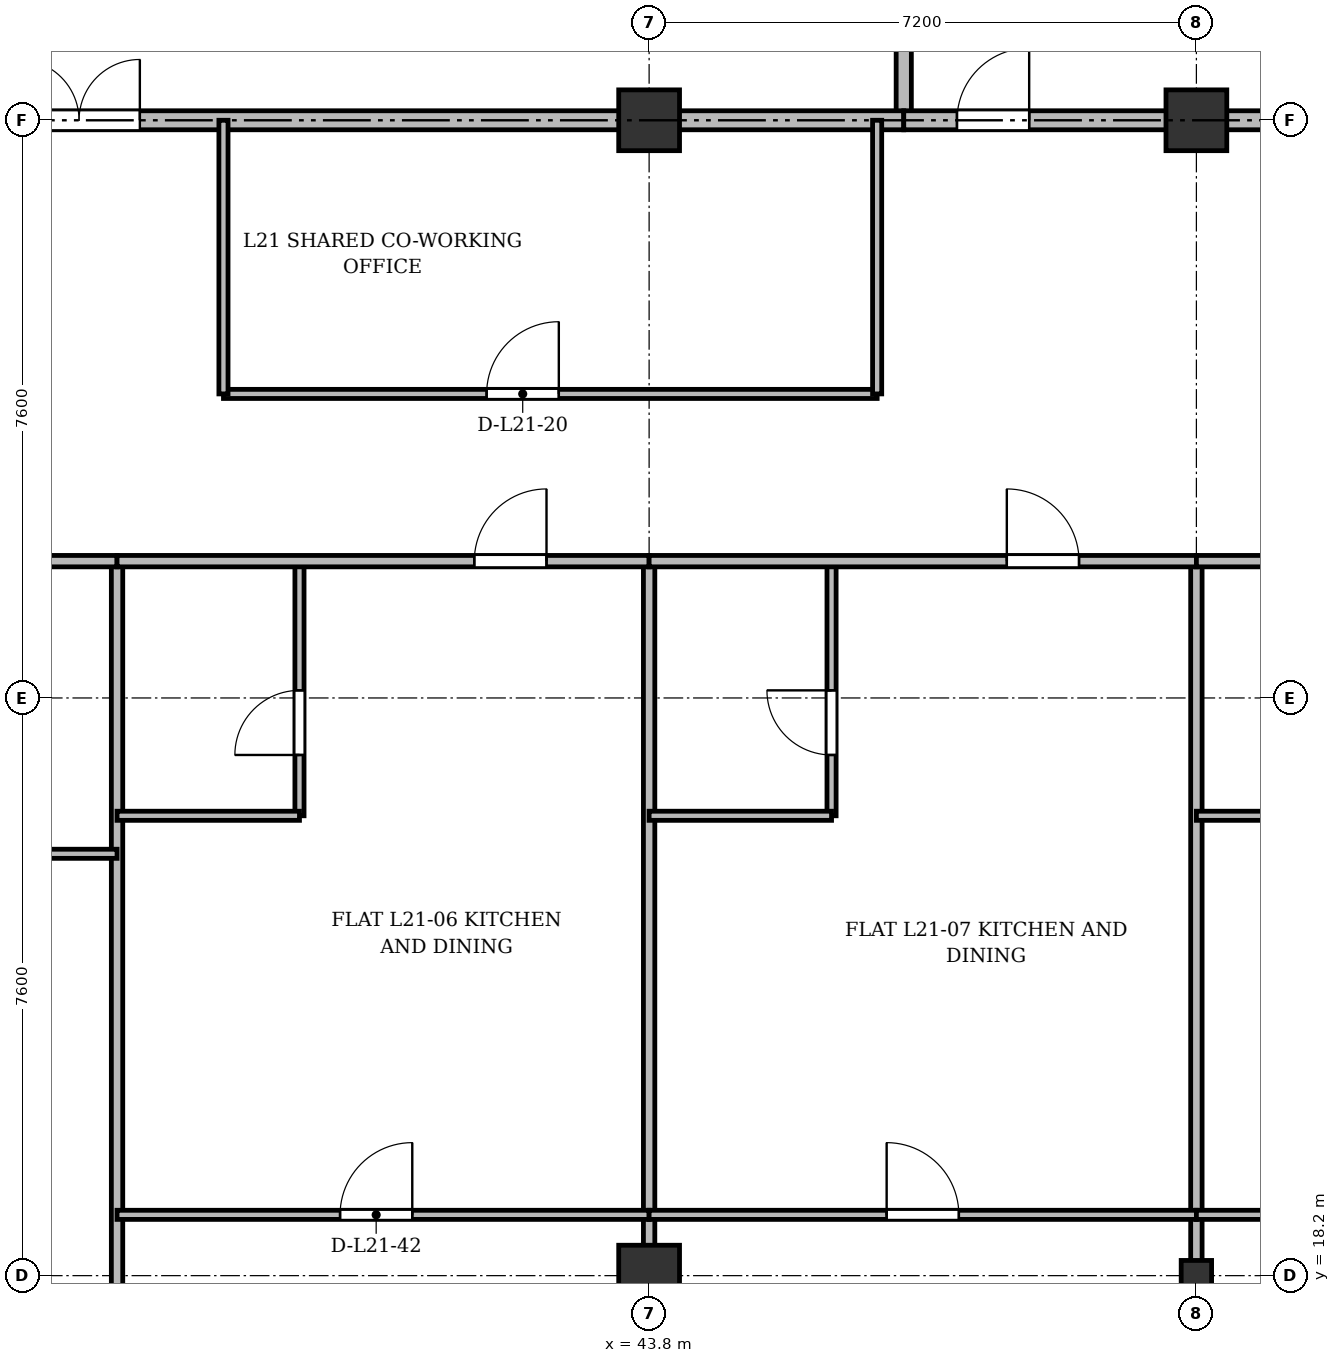
"""IFC4 building model, lengths in metres.
Left out: names, types, materials, properties, quantities, classifications, styles, units other than length and angle.
Written with IfcOpenShell. Run it as: python <this file> out.ifc"""

import sys

from ifc_helpers import new_model, si_unit, direction, frame, frame_2d, origin, origin_2d, place, context, subcontext, project, spatial, rectangle, i_section, extrude, source, transform, mapped, element, fill, save


model = new_model("IFC4")
c1 = context("Model", 3, precision=1e-05, world=origin(), true_north=direction((0.0, 1.0)))
c2 = subcontext(c1, "Body", "Model", "MODEL_VIEW")
j1 = project(units=[si_unit("LENGTHUNIT", "METRE"), si_unit("PLANEANGLEUNIT", "RADIAN")], contexts=[c1])
p1 = place(None, origin())
s1 = spatial("IfcSite", under=j1, at=p1, CompositionType="ELEMENT")
p2 = place(p1, origin())
s2 = spatial("IfcBuilding", under=s1, at=p2, CompositionType="ELEMENT")
p3 = place(p2, frame((0.0, 0.0, 85.3)))
s3 = spatial("IfcBuildingStorey", under=s2, at=p3, CompositionType="ELEMENT", Elevation=85.3)
m1 = source(origin(), c2, "Body", "SweptSolid", [
    extrude(rectangle(XDim=0.8, YDim=0.8, at=origin_2d()), origin(), (0.0, 0.0, 1.0), 3.6),
])
for number, where, z_axis, x_axis in (
    (1, (43.8, 18.2, 0.0), (0.0, 0.0, 1.0), (1.0, 0.0, 0.0)),
    (2, (43.8, 33.4, 0.0), (0.0, 0.0, 1.0), (1.0, 0.0, 0.0)),
):
    element("IfcColumn", number, at=place(p3, frame(where, z_axis=z_axis, x_axis=x_axis)), inside=s3, PredefinedType="COLUMN", context=c2, shape_type="MappedRepresentation", body=[
        mapped(m1, transform((0.0, 0.0, 0.0), x_axis=(1.0, 0.0, 0.0), y_axis=(0.0, 1.0, 0.0), z_axis=(0.0, 0.0, 1.0), scale=1.0)),
    ])
m2 = source(origin(), c2, "Body", "SweptSolid", [
    extrude(i_section(OverallWidth=0.4, OverallDepth=0.4, WebThickness=0.022, FlangeThickness=0.035, at=origin_2d()), origin(), (0.0, 0.0, 1.0), 3.6),
])
p4 = place(p3, frame((51.0, 18.2, 0.0), z_axis=(0.0, 0.0, 1.0), x_axis=(1.0, 0.0, 0.0)))
e3 = element("IfcColumn", 3, at=p4, inside=s3, PredefinedType="COLUMN", context=c2, shape_type="MappedRepresentation", body=[
    mapped(m2, transform((0.0, 0.0, 0.0), x_axis=(1.0, 0.0, 0.0), y_axis=(0.0, 1.0, 0.0), z_axis=(0.0, 0.0, 1.0), scale=1.0)),
])
p5 = place(p3, frame((51.0, 33.4, 0.0), z_axis=(0.0, 0.0, 1.0), x_axis=(1.0, 0.0, 0.0)))
e4 = element("IfcColumn", 4, at=p5, inside=s3, PredefinedType="COLUMN", context=c2, shape_type="MappedRepresentation", body=[
    mapped(m1, transform((0.0, 0.0, 0.0), x_axis=(1.0, 0.0, 0.0), y_axis=(0.0, 1.0, 0.0), z_axis=(0.0, 0.0, 1.0), scale=1.0)),
])
p6 = place(p3, frame((47.15, 33.4, 0.0), z_axis=(0.0, 0.0, 1.0), x_axis=(0.0, 1.0, 0.0)))
e5 = element("IfcWall", 5, at=p6, inside=s3, PredefinedType="SOLIDWALL", context=c2, shape_type="SweptSolid", body=[
    extrude(rectangle(XDim=11.3, YDim=0.2, at=frame_2d((5.65, 0.0))), origin(), (0.0, 0.0, 1.0), 2.752),
])
p7 = place(p3, frame((26.3, 33.4, 0.0), z_axis=(0.0, 0.0, 1.0), x_axis=(1.0, 0.0, 0.0)))
e6 = element("IfcWall", 6, at=p7, inside=s3, PredefinedType="PARTITIONING", context=c2, shape_type="SweptSolid", body=[
    extrude(rectangle(XDim=20.85, YDim=0.25, at=frame_2d((10.425, 0.0))), origin(), (0.0, 0.0, 1.0), 2.752),
])
p8 = place(p7, frame((9.2, 0.0, 0.0)))
e7 = element("IfcOpeningElement", 7, at=p8, cuts=e6, PredefinedType="OPENING", context=c2, shape_type="SweptSolid", body=[
    extrude(rectangle(XDim=1.6, YDim=2.2, at=frame_2d((0.8, 1.1))), frame((0.0, 0.135, 0.0), z_axis=(0.0, -1.0, 0.0), x_axis=(1.0, 0.0, 0.0)), (0.0, 0.0, 1.0), 0.27),
])
p9 = place(p3, frame((47.15, 33.4, 0.0), z_axis=(0.0, 0.0, 1.0), x_axis=(1.0, 0.0, 0.0)))
e8 = element("IfcWall", 8, at=p9, inside=s3, PredefinedType="PARTITIONING", context=c2, shape_type="SweptSolid", body=[
    extrude(rectangle(XDim=11.15, YDim=0.25, at=frame_2d((5.575, 0.0))), origin(), (0.0, 0.0, 1.0), 2.752),
])
p10 = place(p9, frame((0.7, 0.0, 0.0)))
e9 = element("IfcOpeningElement", 9, at=p10, cuts=e8, PredefinedType="OPENING", context=c2, shape_type="SweptSolid", body=[
    extrude(rectangle(XDim=0.95, YDim=2.15, at=frame_2d((0.475, 1.075))), frame((0.0, 0.135, 0.0), z_axis=(0.0, -1.0, 0.0), x_axis=(1.0, 0.0, 0.0)), (0.0, 0.0, 1.0), 0.27),
])
p11 = place(p9, frame((6.0, 0.0, 0.0)))
e10 = element("IfcOpeningElement", 10, at=p11, cuts=e8, PredefinedType="OPENING", context=c2, shape_type="SweptSolid", body=[
    extrude(rectangle(XDim=1.2, YDim=2.15, at=frame_2d((0.6, 1.075))), frame((0.0, 0.135, 0.0), z_axis=(0.0, -1.0, 0.0), x_axis=(1.0, 0.0, 0.0)), (0.0, 0.0, 1.0), 0.27),
])
p12 = place(p3, frame((38.2, 29.8, 0.0), z_axis=(0.0, 0.0, 1.0), x_axis=(1.0, 0.0, 0.0)))
e11 = element("IfcWall", 11, at=p12, inside=s3, PredefinedType="PARTITIONING", context=c2, shape_type="SweptSolid", body=[
    extrude(rectangle(XDim=8.6, YDim=0.12, at=frame_2d((4.3, 0.0))), origin(), (0.0, 0.0, 1.0), 2.84),
])
p13 = place(p12, frame((3.462, 0.0, 0.0)))
e12 = element("IfcOpeningElement", 12, at=p13, cuts=e11, PredefinedType="OPENING", context=c2, shape_type="SweptSolid", body=[
    extrude(rectangle(XDim=0.95, YDim=2.15, at=frame_2d((0.475, 1.075))), frame((0.0, 0.07, 0.0), z_axis=(0.0, -1.0, 0.0), x_axis=(1.0, 0.0, 0.0)), (0.0, 0.0, 1.0), 0.14),
])
for number, where, z_axis, x_axis in (
    (13, (38.2, 29.8, 0.0), (0.0, 0.0, 1.0), (0.0, 1.0, 0.0)),
    (14, (46.8, 29.8, 0.0), (0.0, 0.0, 1.0), (0.0, 1.0, 0.0)),
):
    element("IfcWall", number, at=place(p3, frame(where, z_axis=z_axis, x_axis=x_axis)), inside=s3, PredefinedType="PARTITIONING", context=c2, shape_type="SweptSolid", body=[
        extrude(rectangle(XDim=3.6, YDim=0.12, at=frame_2d((1.8, 0.0))), origin(), (0.0, 0.0, 1.0), 2.752),
    ])
p14 = place(p3, frame((36.8, 3.145, 0.0), z_axis=(0.0, 0.0, 1.0), x_axis=(0.0, 1.0, 0.0)))
e15 = element("IfcWall", 15, at=p14, inside=s3, PredefinedType="PARTITIONING", context=c2, shape_type="SweptSolid", body=[
    extrude(rectangle(XDim=24.455, YDim=0.15, at=frame_2d((12.228, 0.0))), origin(), (0.0, 0.0, 1.0), 2.752),
])
for number, where, z_axis, x_axis in (
    (16, (43.8, 3.145, 0.0), (0.0, 0.0, 1.0), (0.0, 1.0, 0.0)),
    (17, (51.0, 3.145, 0.0), (0.0, 0.0, 1.0), (0.0, 1.0, 0.0)),
):
    element("IfcWall", number, at=place(p3, frame(where, z_axis=z_axis, x_axis=x_axis)), inside=s3, PredefinedType="PARTITIONING", context=c2, shape_type="SweptSolid", body=[
        extrude(rectangle(XDim=24.455, YDim=0.15, at=frame_2d((12.228, 0.0))), origin(), (0.0, 0.0, 1.0), 2.84),
    ])
p15 = place(p3, frame((30.6, 27.6, 0.0), z_axis=(0.0, 0.0, 1.0), x_axis=(1.0, 0.0, 0.0)))
e18 = element("IfcWall", 18, at=p15, inside=s3, PredefinedType="PARTITIONING", context=c2, shape_type="SweptSolid", body=[
    extrude(rectangle(XDim=6.2, YDim=0.15, at=frame_2d((3.1, 0.0))), origin(), (0.0, 0.0, 1.0), 2.84),
])
p16 = place(p15, frame((2.625, 0.0, 0.0)))
e19 = element("IfcOpeningElement", 19, at=p16, cuts=e18, PredefinedType="OPENING", context=c2, shape_type="SweptSolid", body=[
    extrude(rectangle(XDim=0.95, YDim=2.15, at=frame_2d((0.475, 1.075))), frame((0.0, 0.085, 0.0), z_axis=(0.0, -1.0, 0.0), x_axis=(1.0, 0.0, 0.0)), (0.0, 0.0, 1.0), 0.17),
])
p17 = place(p3, frame((30.6, 23.75, 0.0), z_axis=(0.0, 0.0, 1.0), x_axis=(1.0, 0.0, 0.0)))
e20 = element("IfcWall", 20, at=p17, inside=s3, PredefinedType="PARTITIONING", context=c2, shape_type="SweptSolid", body=[
    extrude(rectangle(XDim=6.2, YDim=0.12, at=frame_2d((3.1, 0.0))), origin(), (0.0, 0.0, 1.0), 2.84),
])
p18 = place(p17, frame((2.625, 0.0, 0.0)))
e21 = element("IfcOpeningElement", 21, at=p18, cuts=e20, PredefinedType="OPENING", context=c2, shape_type="SweptSolid", body=[
    extrude(rectangle(XDim=0.95, YDim=2.15, at=frame_2d((0.475, 1.075))), frame((0.0, 0.07, 0.0), z_axis=(0.0, -1.0, 0.0), x_axis=(1.0, 0.0, 0.0)), (0.0, 0.0, 1.0), 0.14),
])
p19 = place(p3, frame((36.8, 19.0, 0.0), z_axis=(0.0, 0.0, 1.0), x_axis=(1.0, 0.0, 0.0)))
e22 = element("IfcWall", 22, at=p19, inside=s3, PredefinedType="PARTITIONING", context=c2, shape_type="SweptSolid", body=[
    extrude(rectangle(XDim=7.0, YDim=0.12, at=frame_2d((3.5, 0.0))), origin(), (0.0, 0.0, 1.0), 2.84),
])
p20 = place(p19, frame((2.934, 0.0, 0.0)))
e23 = element("IfcOpeningElement", 23, at=p20, cuts=e22, PredefinedType="OPENING", context=c2, shape_type="SweptSolid", body=[
    extrude(rectangle(XDim=0.95, YDim=2.15, at=frame_2d((0.475, 1.075))), frame((0.0, 0.07, 0.0), z_axis=(0.0, -1.0, 0.0), x_axis=(1.0, 0.0, 0.0)), (0.0, 0.0, 1.0), 0.14),
])
p21 = place(p3, frame((39.2, 24.25, 0.0), z_axis=(0.0, 0.0, 1.0), x_axis=(0.0, 1.0, 0.0)))
e24 = element("IfcWall", 24, at=p21, inside=s3, PredefinedType="PARTITIONING", context=c2, shape_type="SweptSolid", body=[
    extrude(rectangle(XDim=3.35, YDim=0.12, at=frame_2d((1.675, 0.0))), origin(), (0.0, 0.0, 1.0), 2.99),
])
p22 = place(p21, frame((0.8, 0.0, 0.0)))
e25 = element("IfcOpeningElement", 25, at=p22, cuts=e24, PredefinedType="OPENING", context=c2, shape_type="SweptSolid", body=[
    extrude(rectangle(XDim=0.85, YDim=2.1, at=frame_2d((0.425, 1.05))), frame((0.0, 0.07, 0.0), z_axis=(0.0, -1.0, 0.0), x_axis=(1.0, 0.0, 0.0)), (0.0, 0.0, 1.0), 0.14),
])
p23 = place(p3, frame((36.8, 24.25, 0.0), z_axis=(0.0, 0.0, 1.0), x_axis=(1.0, 0.0, 0.0)))
e26 = element("IfcWall", 26, at=p23, inside=s3, PredefinedType="PARTITIONING", context=c2, shape_type="SweptSolid", body=[
    extrude(rectangle(XDim=2.4, YDim=0.12, at=frame_2d((1.2, 0.0))), origin(), (0.0, 0.0, 1.0), 3.34),
])
p24 = place(p3, frame((36.8, 27.6, 0.0), z_axis=(0.0, 0.0, 1.0), x_axis=(1.0, 0.0, 0.0)))
e27 = element("IfcWall", 27, at=p24, inside=s3, PredefinedType="PARTITIONING", context=c2, shape_type="SweptSolid", body=[
    extrude(rectangle(XDim=7.0, YDim=0.15, at=frame_2d((3.5, 0.0))), origin(), (0.0, 0.0, 1.0), 2.84),
])
p25 = place(p24, frame((4.7, 0.0, 0.0)))
e28 = element("IfcOpeningElement", 28, at=p25, cuts=e27, PredefinedType="OPENING", context=c2, shape_type="SweptSolid", body=[
    extrude(rectangle(XDim=0.95, YDim=2.15, at=frame_2d((0.475, 1.075))), frame((0.0, 0.085, 0.0), z_axis=(0.0, -1.0, 0.0), x_axis=(1.0, 0.0, 0.0)), (0.0, 0.0, 1.0), 0.17),
])
p26 = place(p3, frame((43.8, 19.0, 0.0), z_axis=(0.0, 0.0, 1.0), x_axis=(1.0, 0.0, 0.0)))
e29 = element("IfcWall", 29, at=p26, inside=s3, PredefinedType="PARTITIONING", context=c2, shape_type="SweptSolid", body=[
    extrude(rectangle(XDim=7.2, YDim=0.12, at=frame_2d((3.6, 0.0))), origin(), (0.0, 0.0, 1.0), 2.84),
])
p27 = place(p26, frame((3.125, 0.0, 0.0)))
e30 = element("IfcOpeningElement", 30, at=p27, cuts=e29, PredefinedType="OPENING", context=c2, shape_type="SweptSolid", body=[
    extrude(rectangle(XDim=0.95, YDim=2.15, at=frame_2d((0.475, 1.075))), frame((0.0, 0.07, 0.0), z_axis=(0.0, -1.0, 0.0), x_axis=(1.0, 0.0, 0.0)), (0.0, 0.0, 1.0), 0.14),
])
p28 = place(p3, frame((46.2, 24.25, 0.0), z_axis=(0.0, 0.0, 1.0), x_axis=(0.0, 1.0, 0.0)))
e31 = element("IfcWall", 31, at=p28, inside=s3, PredefinedType="PARTITIONING", context=c2, shape_type="SweptSolid", body=[
    extrude(rectangle(XDim=3.35, YDim=0.12, at=frame_2d((1.675, 0.0))), origin(), (0.0, 0.0, 1.0), 2.99),
])
p29 = place(p28, frame((0.8, 0.0, 0.0)))
e32 = element("IfcOpeningElement", 32, at=p29, cuts=e31, PredefinedType="OPENING", context=c2, shape_type="SweptSolid", body=[
    extrude(rectangle(XDim=0.85, YDim=2.1, at=frame_2d((0.425, 1.05))), frame((0.0, 0.07, 0.0), z_axis=(0.0, -1.0, 0.0), x_axis=(1.0, 0.0, 0.0)), (0.0, 0.0, 1.0), 0.14),
])
p30 = place(p3, frame((43.8, 24.25, 0.0), z_axis=(0.0, 0.0, 1.0), x_axis=(1.0, 0.0, 0.0)))
e33 = element("IfcWall", 33, at=p30, inside=s3, PredefinedType="PARTITIONING", context=c2, shape_type="SweptSolid", body=[
    extrude(rectangle(XDim=2.4, YDim=0.12, at=frame_2d((1.2, 0.0))), origin(), (0.0, 0.0, 1.0), 2.84),
])
p31 = place(p3, frame((43.8, 27.6, 0.0), z_axis=(0.0, 0.0, 1.0), x_axis=(1.0, 0.0, 0.0)))
e34 = element("IfcWall", 34, at=p31, inside=s3, PredefinedType="PARTITIONING", context=c2, shape_type="SweptSolid", body=[
    extrude(rectangle(XDim=7.2, YDim=0.15, at=frame_2d((3.6, 0.0))), origin(), (0.0, 0.0, 1.0), 2.84),
])
p32 = place(p31, frame((4.706, 0.0, 0.0)))
e35 = element("IfcOpeningElement", 35, at=p32, cuts=e34, PredefinedType="OPENING", context=c2, shape_type="SweptSolid", body=[
    extrude(rectangle(XDim=0.95, YDim=2.15, at=frame_2d((0.475, 1.075))), frame((0.0, 0.085, 0.0), z_axis=(0.0, -1.0, 0.0), x_axis=(1.0, 0.0, 0.0)), (0.0, 0.0, 1.0), 0.17),
])
p33 = place(p3, frame((51.0, 19.0, 0.0), z_axis=(0.0, 0.0, 1.0), x_axis=(1.0, 0.0, 0.0)))
e36 = element("IfcWall", 36, at=p33, inside=s3, PredefinedType="PARTITIONING", context=c2, shape_type="SweptSolid", body=[
    extrude(rectangle(XDim=7.8, YDim=0.12, at=frame_2d((3.9, 0.0))), origin(), (0.0, 0.0, 1.0), 2.84),
])
p34 = place(p33, frame((3.333, 0.0, 0.0)))
e37 = element("IfcOpeningElement", 37, at=p34, cuts=e36, PredefinedType="OPENING", context=c2, shape_type="SweptSolid", body=[
    extrude(rectangle(XDim=0.95, YDim=2.15, at=frame_2d((0.475, 1.075))), frame((0.0, 0.07, 0.0), z_axis=(0.0, -1.0, 0.0), x_axis=(1.0, 0.0, 0.0)), (0.0, 0.0, 1.0), 0.14),
])
p35 = place(p3, frame((51.0, 24.25, 0.0), z_axis=(0.0, 0.0, 1.0), x_axis=(1.0, 0.0, 0.0)))
e38 = element("IfcWall", 38, at=p35, inside=s3, PredefinedType="PARTITIONING", context=c2, shape_type="SweptSolid", body=[
    extrude(rectangle(XDim=2.4, YDim=0.12, at=frame_2d((1.2, 0.0))), origin(), (0.0, 0.0, 1.0), 2.84),
])
p36 = place(p3, frame((51.0, 27.6, 0.0), z_axis=(0.0, 0.0, 1.0), x_axis=(1.0, 0.0, 0.0)))
e39 = element("IfcWall", 39, at=p36, inside=s3, PredefinedType="PARTITIONING", context=c2, shape_type="SweptSolid", body=[
    extrude(rectangle(XDim=7.8, YDim=0.15, at=frame_2d((3.9, 0.0))), origin(), (0.0, 0.0, 1.0), 2.84),
])
p37 = place(p36, frame((5.172, 0.0, 0.0)))
e40 = element("IfcOpeningElement", 40, at=p37, cuts=e39, PredefinedType="OPENING", context=c2, shape_type="SweptSolid", body=[
    extrude(rectangle(XDim=0.95, YDim=2.15, at=frame_2d((0.475, 1.075))), frame((0.0, 0.085, 0.0), z_axis=(0.0, -1.0, 0.0), x_axis=(1.0, 0.0, 0.0)), (0.0, 0.0, 1.0), 0.17),
])
m3 = source(origin(), c2, "Body", "SweptSolid", [
    extrude(rectangle(XDim=1.6, YDim=2.2, at=frame_2d((0.8, 1.1))), frame((0.0, 0.025, 0.0), z_axis=(0.0, -1.0, 0.0), x_axis=(1.0, 0.0, 0.0)), (0.0, 0.0, 1.0), 0.05),
])
p38 = place(p8, origin())
e41 = element("IfcDoor", 41, at=p38, inside=s3, OperationType="DOUBLE_DOOR_SINGLE_SWING", PredefinedType="DOOR", context=c2, shape_type="MappedRepresentation", body=[
    mapped(m3, transform((0.0, 0.0, 0.0), x_axis=(1.0, 0.0, 0.0), y_axis=(0.0, 1.0, 0.0), z_axis=(0.0, 0.0, 1.0), scale=1.0)),
])
fill(e7, e41)
m4 = source(origin(), c2, "Body", "SweptSolid", [
    extrude(rectangle(XDim=0.95, YDim=2.15, at=frame_2d((0.475, 1.075))), frame((0.0, 0.025, 0.0), z_axis=(0.0, -1.0, 0.0), x_axis=(1.0, 0.0, 0.0)), (0.0, 0.0, 1.0), 0.05),
])
p39 = place(p10, origin())
e42 = element("IfcDoor", 42, at=p39, inside=s3, OperationType="SINGLE_SWING_RIGHT", PredefinedType="DOOR", context=c2, shape_type="MappedRepresentation", body=[
    mapped(m4, transform((0.0, 0.0, 0.0), x_axis=(1.0, 0.0, 0.0), y_axis=(0.0, 1.0, 0.0), z_axis=(0.0, 0.0, 1.0), scale=1.0)),
])
fill(e9, e42)
p40 = place(p13, origin())
e43 = element("IfcDoor", 43, at=p40, inside=s3, OperationType="SINGLE_SWING_RIGHT", PredefinedType="DOOR", context=c2, shape_type="MappedRepresentation", body=[
    mapped(m4, transform((0.0, 0.0, 0.0), x_axis=(1.0, 0.0, 0.0), y_axis=(0.0, 1.0, 0.0), z_axis=(0.0, 0.0, 1.0), scale=1.0)),
])
fill(e12, e43)
p41 = place(p20, origin())
e44 = element("IfcDoor", 44, at=p41, inside=s3, OperationType="SINGLE_SWING_RIGHT", PredefinedType="DOOR", context=c2, shape_type="MappedRepresentation", body=[
    mapped(m4, transform((0.0, 0.0, 0.0), x_axis=(1.0, 0.0, 0.0), y_axis=(0.0, 1.0, 0.0), z_axis=(0.0, 0.0, 1.0), scale=1.0)),
])
fill(e23, e44)
m5 = source(origin(), c2, "Body", "SweptSolid", [
    extrude(rectangle(XDim=0.85, YDim=2.1, at=frame_2d((0.425, 1.05))), frame((0.0, 0.025, 0.0), z_axis=(0.0, -1.0, 0.0), x_axis=(1.0, 0.0, 0.0)), (0.0, 0.0, 1.0), 0.05),
])
p42 = place(p22, origin())
e45 = element("IfcDoor", 45, at=p42, inside=s3, OperationType="SINGLE_SWING_LEFT", PredefinedType="DOOR", context=c2, shape_type="MappedRepresentation", body=[
    mapped(m5, transform((0.0, 0.0, 0.0), x_axis=(1.0, 0.0, 0.0), y_axis=(0.0, 1.0, 0.0), z_axis=(0.0, 0.0, 1.0), scale=1.0)),
])
fill(e25, e45)
p43 = place(p25, origin())
e46 = element("IfcDoor", 46, at=p43, inside=s3, OperationType="SINGLE_SWING_RIGHT", PredefinedType="DOOR", context=c2, shape_type="MappedRepresentation", body=[
    mapped(m4, transform((0.0, 0.0, 0.0), x_axis=(1.0, 0.0, 0.0), y_axis=(0.0, 1.0, 0.0), z_axis=(0.0, 0.0, 1.0), scale=1.0)),
])
fill(e28, e46)
p44 = place(p27, origin())
e47 = element("IfcDoor", 47, at=p44, inside=s3, OperationType="SINGLE_SWING_LEFT", PredefinedType="DOOR", context=c2, shape_type="MappedRepresentation", body=[
    mapped(m4, transform((0.0, 0.0, 0.0), x_axis=(1.0, 0.0, 0.0), y_axis=(0.0, 1.0, 0.0), z_axis=(0.0, 0.0, 1.0), scale=1.0)),
])
fill(e30, e47)
p45 = place(p29, origin())
e48 = element("IfcDoor", 48, at=p45, inside=s3, OperationType="SINGLE_SWING_RIGHT", PredefinedType="DOOR", context=c2, shape_type="MappedRepresentation", body=[
    mapped(m5, transform((0.0, 0.0, 0.0), x_axis=(1.0, 0.0, 0.0), y_axis=(0.0, 1.0, 0.0), z_axis=(0.0, 0.0, 1.0), scale=1.0)),
])
fill(e32, e48)
p46 = place(p32, origin())
e49 = element("IfcDoor", 49, at=p46, inside=s3, OperationType="SINGLE_SWING_LEFT", PredefinedType="DOOR", context=c2, shape_type="MappedRepresentation", body=[
    mapped(m4, transform((0.0, 0.0, 0.0), x_axis=(1.0, 0.0, 0.0), y_axis=(0.0, 1.0, 0.0), z_axis=(0.0, 0.0, 1.0), scale=1.0)),
])
fill(e35, e49)
save(model, sys.argv[1])
